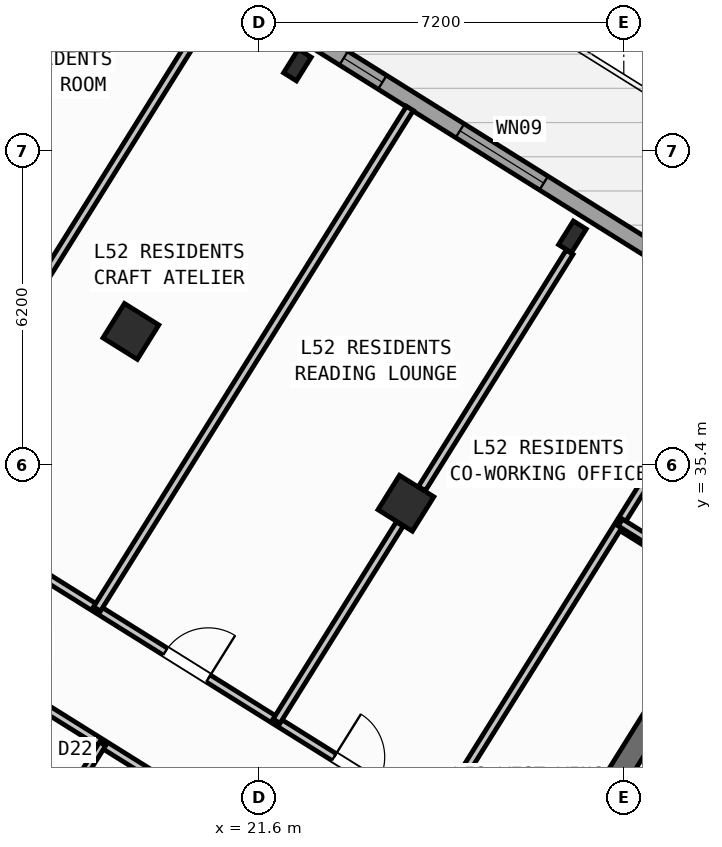
"""IFC4 building model, lengths in metres.
Left out: names, types, materials, properties, quantities, classifications, styles, units other than length and angle.
Written with IfcOpenShell. Run it as: python <this file> out.ifc"""

import sys

from ifc_helpers import new_model, si_unit, direction, frame, frame_2d, origin, origin_2d, place, context, subcontext, project, spatial, rectangle, hollow_rectangle, i_section, extrude, source, transform, mapped, element, fill, save


model = new_model("IFC4")
c1 = context("Model", 3, precision=1e-05, world=origin(), true_north=direction((0.0, 1.0)))
c2 = subcontext(c1, "Body", "Model", "MODEL_VIEW")
j1 = project(units=[si_unit("LENGTHUNIT", "METRE"), si_unit("PLANEANGLEUNIT", "RADIAN")], contexts=[c1])
p1 = place(None, origin())
s1 = spatial("IfcSite", under=j1, at=p1, CompositionType="ELEMENT")
p2 = place(p1, origin())
s2 = spatial("IfcBuilding", under=s1, at=p2, CompositionType="ELEMENT")
p3 = place(p2, frame((0.0, 0.0, 207.6)))
s3 = spatial("IfcBuildingStorey", under=s2, at=p3, CompositionType="ELEMENT", Elevation=207.6)
p4 = place(p3, frame((29.544, 30.636, 0.0), z_axis=(0.0, 0.0, 1.0), x_axis=(-0.529902075036, -0.848058836916, 0.0)))
e1 = element("IfcWall", 1, at=p4, inside=s3, PredefinedType="SHEAR", context=c2, shape_type="SweptSolid", body=[
    extrude(rectangle(XDim=3.625, YDim=0.45, at=frame_2d((1.812, 0.0))), origin(), (0.0, 0.0, 1.0), 3.35),
])
m1 = source(origin(), c2, "Body", "SweptSolid", [
    extrude(i_section(OverallWidth=0.3, OverallDepth=0.55, WebThickness=0.015, FlangeThickness=0.029, at=origin_2d()), origin(), (0.0, 0.0, 1.0), 3.6),
])
p5 = place(p3, frame((27.786, 39.901, 0.0), z_axis=(0.0, 0.0, 1.0), x_axis=(-0.848048096156, 0.529919264233, 0.0)))
e2 = element("IfcColumn", 2, at=p5, inside=s3, PredefinedType="COLUMN", context=c2, shape_type="MappedRepresentation", body=[
    mapped(m1, transform((0.0, 0.0, 0.0), scale=1.0)),
])
m2 = source(origin(), c2, "Body", "SweptSolid", [
    extrude(hollow_rectangle(XDim=0.8, YDim=0.8, WallThickness=0.032, at=origin_2d()), origin(), (0.0, 0.0, 1.0), 3.6),
])
p6 = place(p3, frame((24.5, 34.643, 0.0), z_axis=(0.0, 0.0, 1.0), x_axis=(-0.848048096156, 0.529919264233, 0.0)))
e3 = element("IfcColumn", 3, at=p6, inside=s3, PredefinedType="COLUMN", context=c2, shape_type="MappedRepresentation", body=[
    mapped(m2, transform((0.0, 0.0, 0.0), scale=1.0)),
])
p7 = place(p3, frame((22.358, 43.292, 0.0), z_axis=(0.0, 0.0, 1.0), x_axis=(-0.848048096156, 0.529919264233, 0.0)))
e4 = element("IfcColumn", 4, at=p7, inside=s3, PredefinedType="COLUMN", context=c2, shape_type="MappedRepresentation", body=[
    mapped(m1, transform((0.0, 0.0, 0.0), scale=1.0)),
])
p8 = place(p3, frame((19.073, 38.034, 0.0), z_axis=(0.0, 0.0, 1.0), x_axis=(-0.848048096156, 0.529919264233, 0.0)))
e5 = element("IfcColumn", 5, at=p8, inside=s3, PredefinedType="COLUMN", context=c2, shape_type="MappedRepresentation", body=[
    mapped(m2, transform((0.0, 0.0, 0.0), scale=1.0)),
])
p9 = place(p3, frame((17.424, 47.083, 0.0), z_axis=(0.0, 0.0, 1.0), x_axis=(0.848049927979, -0.529916332693, 0.0)))
e6 = element("IfcWall", 6, at=p9, inside=s3, PredefinedType="STANDARD", context=c2, shape_type="SweptSolid", body=[
    extrude(rectangle(XDim=29.223, YDim=0.32, at=frame_2d((14.612, 0.0))), origin(), (0.0, 0.0, 1.0), 3.35),
])
p10 = place(p9, frame((2.526, 0.0, 0.0)))
e7 = element("IfcOpeningElement", 7, at=p10, cuts=e6, PredefinedType="OPENING", context=c2, shape_type="SweptSolid", body=[
    extrude(rectangle(XDim=1.05, YDim=2.15, at=frame_2d((0.525, 1.075))), frame((0.0, 0.17, 0.0), z_axis=(0.0, -1.0, 0.0), x_axis=(1.0, 0.0, 0.0)), (0.0, 0.0, 1.0), 0.34),
])
p11 = place(p9, frame((0.653, 0.0, 0.9)))
e8 = element("IfcOpeningElement", 8, at=p11, cuts=e6, PredefinedType="OPENING", context=c2, shape_type="SweptSolid", body=[
    extrude(rectangle(XDim=1.35, YDim=1.45, at=frame_2d((0.675, 0.725))), frame((0.0, 0.17, 0.0), z_axis=(0.0, -1.0, 0.0), x_axis=(1.0, 0.0, 0.0)), (0.0, 0.0, 1.0), 0.34),
])
p12 = place(p9, frame((6.897, 0.0, 1.0)))
e9 = element("IfcOpeningElement", 9, at=p12, cuts=e6, PredefinedType="OPENING", context=c2, shape_type="SweptSolid", body=[
    extrude(rectangle(XDim=0.9, YDim=1.25, at=frame_2d((0.45, 0.625))), frame((0.0, 0.17, 0.0), z_axis=(0.0, -1.0, 0.0), x_axis=(1.0, 0.0, 0.0)), (0.0, 0.0, 1.0), 0.34),
])
p13 = place(p9, frame((9.602, 0.0, 0.95)))
e10 = element("IfcOpeningElement", 10, at=p13, cuts=e6, PredefinedType="OPENING", context=c2, shape_type="SweptSolid", body=[
    extrude(rectangle(XDim=1.95, YDim=1.35, at=frame_2d((0.975, 0.675))), frame((0.0, 0.17, 0.0), z_axis=(0.0, -1.0, 0.0), x_axis=(1.0, 0.0, 0.0)), (0.0, 0.0, 1.0), 0.34),
])
p14 = place(p9, frame((14.096, 0.0, 1.0)))
e11 = element("IfcOpeningElement", 11, at=p14, cuts=e6, PredefinedType="OPENING", context=c2, shape_type="SweptSolid", body=[
    extrude(rectangle(XDim=0.9, YDim=1.25, at=frame_2d((0.45, 0.625))), frame((0.0, 0.17, 0.0), z_axis=(0.0, -1.0, 0.0), x_axis=(1.0, 0.0, 0.0)), (0.0, 0.0, 1.0), 0.34),
])
p15 = place(p9, frame((17.254, 0.0, 1.0)))
e12 = element("IfcOpeningElement", 12, at=p15, cuts=e6, PredefinedType="OPENING", context=c2, shape_type="SweptSolid", body=[
    extrude(rectangle(XDim=0.9, YDim=1.25, at=frame_2d((0.45, 0.625))), frame((0.0, 0.17, 0.0), z_axis=(0.0, -1.0, 0.0), x_axis=(1.0, 0.0, 0.0)), (0.0, 0.0, 1.0), 0.34),
])
p16 = place(p9, frame((21.139, 0.0, 0.9)))
e13 = element("IfcOpeningElement", 13, at=p16, cuts=e6, PredefinedType="OPENING", context=c2, shape_type="SweptSolid", body=[
    extrude(rectangle(XDim=1.35, YDim=1.45, at=frame_2d((0.675, 0.725))), frame((0.0, 0.17, 0.0), z_axis=(0.0, -1.0, 0.0), x_axis=(1.0, 0.0, 0.0)), (0.0, 0.0, 1.0), 0.34),
])
p17 = place(p9, frame((25.778, 0.0, 0.9)))
e14 = element("IfcOpeningElement", 14, at=p17, cuts=e6, PredefinedType="OPENING", context=c2, shape_type="SweptSolid", body=[
    extrude(rectangle(XDim=1.35, YDim=1.45, at=frame_2d((0.675, 0.725))), frame((0.0, 0.17, 0.0), z_axis=(0.0, -1.0, 0.0), x_axis=(1.0, 0.0, 0.0)), (0.0, 0.0, 1.0), 0.34),
])
p18 = place(p3, frame((30.914, 32.829, 0.0), z_axis=(0.0, 0.0, 1.0), x_axis=(-0.848008813643, 0.529982124211, 0.0)))
e15 = element("IfcWall", 15, at=p18, inside=s3, PredefinedType="PARTITIONING", context=c2, shape_type="SweptSolid", body=[
    extrude(rectangle(XDim=2.61, YDim=0.16, at=frame_2d((1.305, 0.0))), origin(), (0.0, 0.0, 1.0), 3.34),
])
p19 = place(p3, frame((31.239, 38.274, 0.0), z_axis=(0.0, 0.0, 1.0), x_axis=(-0.529925472745, -0.848044216616, 0.0)))
e16 = element("IfcWall", 16, at=p19, inside=s3, PredefinedType="PARTITIONING", context=c2, shape_type="SweptSolid", body=[
    extrude(rectangle(XDim=11.65, YDim=0.16, at=frame_2d((5.825, 0.0))), origin(), (0.0, 0.0, 1.0), 3.34),
])
p20 = place(p3, frame((25.065, 28.394, 0.0), z_axis=(0.0, 0.0, 1.0), x_axis=(-0.848048310262, 0.529918921593, 0.0)))
e17 = element("IfcWall", 17, at=p20, inside=s3, PredefinedType="PARTITIONING", context=c2, shape_type="SweptSolid", body=[
    extrude(rectangle(XDim=16.73, YDim=0.16, at=frame_2d((8.365, 0.0))), origin(), (0.0, 0.0, 1.0), 3.34),
])
p21 = place(p20, frame((1.338, 0.0, 0.0)))
e18 = element("IfcOpeningElement", 18, at=p21, cuts=e17, PredefinedType="OPENING", context=c2, shape_type="SweptSolid", body=[
    extrude(rectangle(XDim=1.0, YDim=2.1, at=frame_2d((0.5, 1.05))), frame((0.0, 0.09, 0.0), z_axis=(0.0, -1.0, 0.0), x_axis=(1.0, 0.0, 0.0)), (0.0, 0.0, 1.0), 0.18),
])
p22 = place(p20, frame((5.265, 0.0, 0.0)))
e19 = element("IfcOpeningElement", 19, at=p22, cuts=e17, PredefinedType="OPENING", context=c2, shape_type="SweptSolid", body=[
    extrude(rectangle(XDim=1.0, YDim=2.1, at=frame_2d((0.5, 1.05))), frame((0.0, 0.09, 0.0), z_axis=(0.0, -1.0, 0.0), x_axis=(1.0, 0.0, 0.0)), (0.0, 0.0, 1.0), 0.18),
])
p23 = place(p20, frame((9.526, 0.0, 0.0)))
e20 = element("IfcOpeningElement", 20, at=p23, cuts=e17, PredefinedType="OPENING", context=c2, shape_type="SweptSolid", body=[
    extrude(rectangle(XDim=1.0, YDim=2.1, at=frame_2d((0.5, 1.05))), frame((0.0, 0.09, 0.0), z_axis=(0.0, -1.0, 0.0), x_axis=(1.0, 0.0, 0.0)), (0.0, 0.0, 1.0), 0.18),
])
p24 = place(p20, frame((13.954, 0.0, 0.0)))
e21 = element("IfcOpeningElement", 21, at=p24, cuts=e17, PredefinedType="OPENING", context=c2, shape_type="SweptSolid", body=[
    extrude(rectangle(XDim=1.0, YDim=2.1, at=frame_2d((0.5, 1.05))), frame((0.0, 0.09, 0.0), z_axis=(0.0, -1.0, 0.0), x_axis=(1.0, 0.0, 0.0)), (0.0, 0.0, 1.0), 0.18),
])
p25 = place(p3, frame((20.336, 28.755, 0.0), z_axis=(0.0, 0.0, 1.0), x_axis=(-0.848049955116, 0.529916289265, 0.0)))
e22 = element("IfcWall", 22, at=p25, inside=s3, PredefinedType="PARTITIONING", context=c2, shape_type="SweptSolid", body=[
    extrude(rectangle(XDim=5.576, YDim=0.16, at=frame_2d((2.788, 0.0))), origin(), (0.0, 0.0, 1.0), 2.825),
])
p26 = place(p25, frame((3.618, 0.0, 0.0)))
e23 = element("IfcOpeningElement", 23, at=p26, cuts=e22, PredefinedType="OPENING", context=c2, shape_type="SweptSolid", body=[
    extrude(rectangle(XDim=1.0, YDim=2.1, at=frame_2d((0.5, 1.05))), frame((0.0, 0.09, 0.0), z_axis=(0.0, -1.0, 0.0), x_axis=(1.0, 0.0, 0.0)), (0.0, 0.0, 1.0), 0.18),
])
p27 = place(p3, frame((19.318, 26.349, 0.0), z_axis=(0.0, 0.0, 1.0), x_axis=(-0.848039019877, 0.529933789039, 0.0)))
e24 = element("IfcWall", 24, at=p27, inside=s3, PredefinedType="PLUMBINGWALL", context=c2, shape_type="SweptSolid", body=[
    extrude(rectangle(XDim=6.4, YDim=0.14, at=frame_2d((3.2, 0.0))), origin(), (0.0, 0.0, 1.0), 3.34),
])
p28 = place(p27, frame((2.824, 0.0, 0.0)))
e25 = element("IfcOpeningElement", 25, at=p28, cuts=e24, PredefinedType="OPENING", context=c2, shape_type="SweptSolid", body=[
    extrude(rectangle(XDim=0.78, YDim=2.05, at=frame_2d((0.39, 1.025))), frame((0.0, 0.08, 0.0), z_axis=(0.0, -1.0, 0.0), x_axis=(1.0, 0.0, 0.0)), (0.0, 0.0, 1.0), 0.16),
])
p29 = place(p3, frame((18.514, 29.894, 0.0), z_axis=(0.0, 0.0, 1.0), x_axis=(-0.529913878929, -0.848051461244, 0.0)))
e26 = element("IfcWall", 26, at=p29, inside=s3, PredefinedType="PLUMBINGWALL", context=c2, shape_type="SweptSolid", body=[
    extrude(rectangle(XDim=2.58, YDim=0.14, at=frame_2d((1.29, 0.0))), origin(), (0.0, 0.0, 1.0), 3.34),
])
p30 = place(p29, frame((0.9, 0.0, 0.0)))
e27 = element("IfcOpeningElement", 27, at=p30, cuts=e26, PredefinedType="OPENING", context=c2, shape_type="SweptSolid", body=[
    extrude(rectangle(XDim=0.78, YDim=2.05, at=frame_2d((0.39, 1.025))), frame((0.0, 0.08, 0.0), z_axis=(0.0, -1.0, 0.0), x_axis=(1.0, 0.0, 0.0)), (0.0, 0.0, 1.0), 0.16),
])
p31 = place(p3, frame((27.73, 39.597, 0.0), z_axis=(0.0, 0.0, 1.0), x_axis=(-0.529919150083, -0.848048167486, 0.0)))
e28 = element("IfcWall", 28, at=p31, inside=s3, PredefinedType="PARTITIONING", context=c2, shape_type="SweptSolid", body=[
    extrude(rectangle(XDim=5.501, YDim=0.16, at=frame_2d((2.75, 0.0))), origin(), (0.0, 0.0, 1.0), 2.825),
])
p32 = place(p3, frame((24.379, 34.233, 0.0), z_axis=(0.0, 0.0, 1.0), x_axis=(-0.529922402838, -0.84804613493, 0.0)))
e29 = element("IfcWall", 29, at=p32, inside=s3, PredefinedType="PARTITIONING", context=c2, shape_type="SweptSolid", body=[
    extrude(rectangle(XDim=4.588, YDim=0.16, at=frame_2d((2.294, 0.0))), origin(), (0.0, 0.0, 1.0), 2.825),
])
for number, where, z_axis, x_axis in (
    (30, (24.578, 42.436, 0.0), (0.0, 0.0, 1.0), (-0.53, -0.848, 0.0)),
    (31, (20.894, 44.738, 0.0), (0.0, 0.0, 1.0), (-0.53, -0.848, 0.0)),
):
    element("IfcWall", number, at=place(p3, frame(where, z_axis=z_axis, x_axis=x_axis)), inside=s3, PredefinedType="PARTITIONING", context=c2, shape_type="SweptSolid", body=[
        extrude(rectangle(XDim=11.65, YDim=0.16, at=frame_2d((5.825, 0.0))), origin(), (0.0, 0.0, 1.0), 2.995),
    ])
p33 = place(p3, frame((41.936, 26.012, 0.0), z_axis=(0.0, 0.0, 1.0), x_axis=(-0.848051154596, 0.529914369676, 0.0)))
e32 = element("IfcWall", 32, at=p33, inside=s3, PredefinedType="PARTITIONING", context=c2, shape_type="SweptSolid", body=[
    extrude(rectangle(XDim=15.57, YDim=0.16, at=frame_2d((7.785, 0.0))), origin(), (0.0, 0.0, 1.0), 3.34),
])
p34 = place(p33, frame((10.83, 0.0, 0.0)))
e33 = element("IfcOpeningElement", 33, at=p34, cuts=e32, PredefinedType="OPENING", context=c2, shape_type="SweptSolid", body=[
    extrude(rectangle(XDim=1.0, YDim=2.1, at=frame_2d((0.5, 1.05))), frame((0.0, 0.09, 0.0), z_axis=(0.0, -1.0, 0.0), x_axis=(1.0, 0.0, 0.0)), (0.0, 0.0, 1.0), 0.18),
])
m3 = source(origin(), c2, "Body", "SweptSolid", [
    extrude(rectangle(XDim=0.9, YDim=1.25, at=frame_2d((0.45, 0.625))), frame((0.0, 0.03, 0.0), z_axis=(0.0, -1.0, 0.0), x_axis=(1.0, 0.0, 0.0)), (0.0, 0.0, 1.0), 0.06),
])
p35 = place(p12, origin())
e34 = element("IfcWindow", 34, at=p35, inside=s3, PartitioningType="SINGLE_PANEL", PredefinedType="WINDOW", context=c2, shape_type="MappedRepresentation", body=[
    mapped(m3, transform((0.0, 0.0, 0.0), scale=1.0)),
])
fill(e9, e34)
m4 = source(origin(), c2, "Body", "SweptSolid", [
    extrude(rectangle(XDim=1.95, YDim=1.35, at=frame_2d((0.975, 0.675))), frame((0.0, 0.03, 0.0), z_axis=(0.0, -1.0, 0.0), x_axis=(1.0, 0.0, 0.0)), (0.0, 0.0, 1.0), 0.06),
])
p36 = place(p13, origin())
e35 = element("IfcWindow", 35, at=p36, inside=s3, PartitioningType="SINGLE_PANEL", PredefinedType="WINDOW", context=c2, shape_type="MappedRepresentation", body=[
    mapped(m4, transform((0.0, 0.0, 0.0), scale=1.0)),
])
fill(e10, e35)
m5 = source(origin(), c2, "Body", "SweptSolid", [
    extrude(rectangle(XDim=1.0, YDim=2.1, at=frame_2d((0.5, 1.05))), frame((0.0, 0.025, 0.0), z_axis=(0.0, -1.0, 0.0), x_axis=(1.0, 0.0, 0.0)), (0.0, 0.0, 1.0), 0.05),
])
p37 = place(p21, frame((1.0, 0.0, 0.0), z_axis=(0.0, 0.0, 1.0), x_axis=(-1.0, 0.0, 0.0)))
e36 = element("IfcDoor", 36, at=p37, inside=s3, OperationType="SINGLE_SWING_LEFT", PredefinedType="DOOR", context=c2, shape_type="MappedRepresentation", body=[
    mapped(m5, transform((0.0, 0.0, 0.0), scale=1.0)),
])
fill(e18, e36)
p38 = place(p22, frame((1.0, 0.0, 0.0), z_axis=(0.0, 0.0, 1.0), x_axis=(-1.0, 0.0, 0.0)))
e37 = element("IfcDoor", 37, at=p38, inside=s3, OperationType="SINGLE_SWING_RIGHT", PredefinedType="DOOR", context=c2, shape_type="MappedRepresentation", body=[
    mapped(m5, transform((0.0, 0.0, 0.0), scale=1.0)),
])
fill(e19, e37)
save(model, sys.argv[1])
